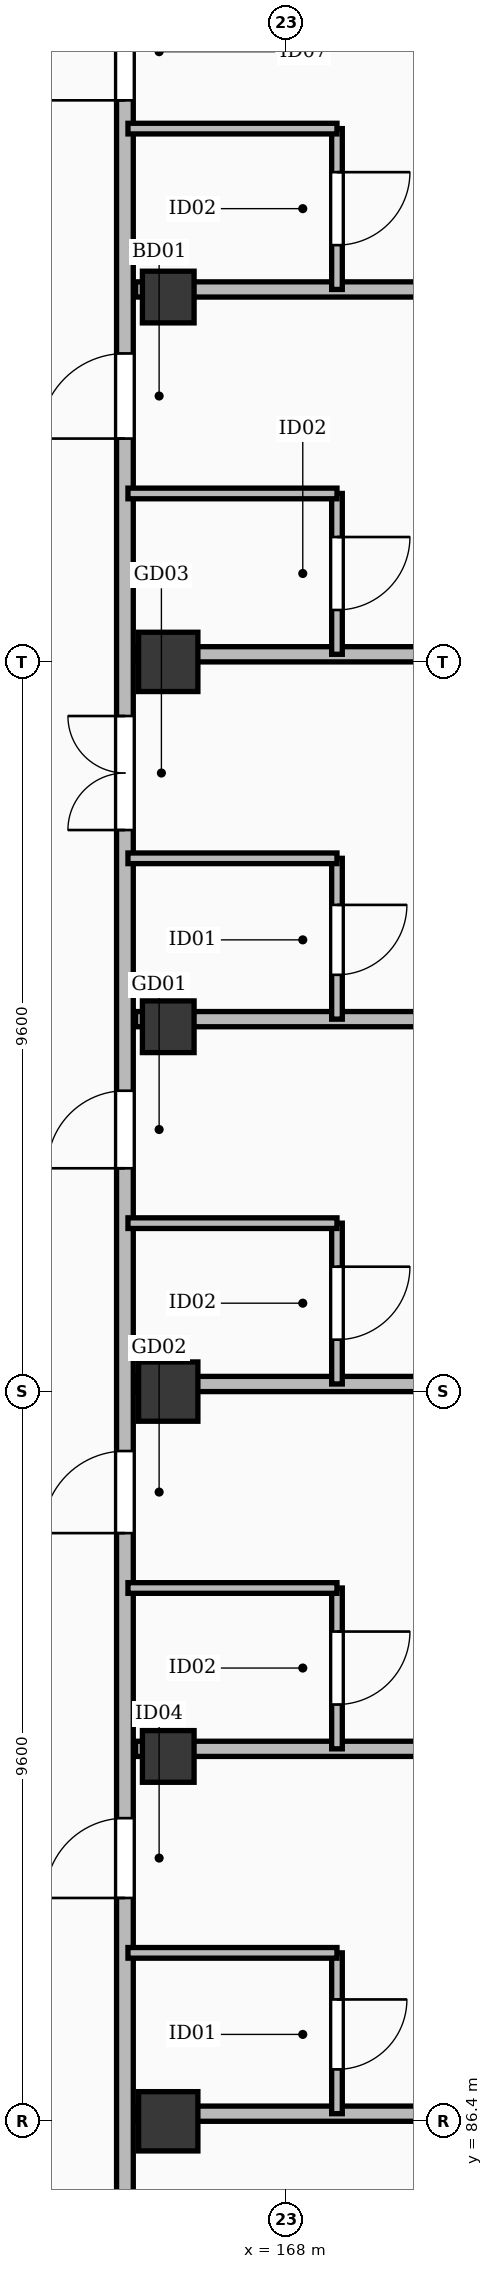
"""IFC4 building model, lengths in metres.
Left out: names, types, materials, properties, quantities, classifications, styles, units other than length and angle.
Written with IfcOpenShell. Run it as: python <this file> out.ifc"""

import sys

from ifc_helpers import new_model, si_unit, direction, frame, frame_2d, origin, origin_2d, place, context, subcontext, project, spatial, rectangle, extrude, element, fill, save


model = new_model("IFC4")
c1 = context("Model", 3, precision=1e-05, world=origin(), true_north=direction((0.0, 1.0)))
c2 = subcontext(c1, "Body", "Model", "MODEL_VIEW")
j1 = project(units=[si_unit("LENGTHUNIT", "METRE"), si_unit("PLANEANGLEUNIT", "RADIAN")], contexts=[c1])
p1 = place(None, origin())
s1 = spatial("IfcSite", under=j1, at=p1, CompositionType="ELEMENT")
p2 = place(p1, origin())
s2 = spatial("IfcBuilding", under=s1, at=p2, CompositionType="ELEMENT")
p3 = place(p2, frame((0.0, 0.0, 24.6)))
s3 = spatial("IfcBuildingStorey", under=s2, at=p3, CompositionType="ELEMENT", Elevation=24.6)
for number, where, z_axis, x_axis in (
    (1, (166.45, 86.4, 0.0), (0.0, 0.0, 1.0), (1.0, 0.0, 0.0)),
    (2, (166.45, 96.0, 0.0), (0.0, 0.0, 1.0), (1.0, 0.0, 0.0)),
    (3, (166.45, 105.6, 0.0), (0.0, 0.0, 1.0), (1.0, 0.0, 0.0)),
):
    element("IfcColumn", number, at=place(p3, frame(where, z_axis=z_axis, x_axis=x_axis)), inside=s3, PredefinedType="COLUMN", context=c2, shape_type="SweptSolid", body=[
        extrude(rectangle(XDim=0.78, YDim=0.78, at=origin_2d()), origin(), (0.0, 0.0, 1.0), 3.6),
    ])
for number, where, z_axis, x_axis in (
    (4, (166.45, 91.2, 0.0), (0.0, 0.0, 1.0), (1.0, 0.0, 0.0)),
    (5, (166.45, 100.8, 0.0), (0.0, 0.0, 1.0), (1.0, 0.0, 0.0)),
    (6, (166.45, 110.4, 0.0), (0.0, 0.0, 1.0), (1.0, 0.0, 0.0)),
):
    element("IfcColumn", number, at=place(p3, frame(where, z_axis=z_axis, x_axis=x_axis)), inside=s3, PredefinedType="COLUMN", context=c2, shape_type="SweptSolid", body=[
        extrude(rectangle(XDim=0.68, YDim=0.68, at=origin_2d()), origin(), (0.0, 0.0, 1.0), 3.6),
    ])
p4 = place(p3, frame((165.88, 65.4, 0.0), z_axis=(0.0, 0.0, 1.0), x_axis=(0.0, 1.0, 0.0)))
e7 = element("IfcWall", 7, at=p4, inside=s3, PredefinedType="PARTITIONING", context=c2, shape_type="SweptSolid", body=[
    extrude(rectangle(XDim=60.25, YDim=0.22, at=frame_2d((30.125, 0.0))), origin(), (0.0, 0.0, 1.0), 2.582),
])
p5 = place(p4, frame((4.738, 0.0, 0.0)))
e8 = element("IfcOpeningElement", 8, at=p5, cuts=e7, PredefinedType="OPENING", context=c2, shape_type="SweptSolid", body=[
    extrude(rectangle(XDim=1.02, YDim=2.2, at=frame_2d((0.51, 1.1))), frame((0.0, 0.122, 0.0), z_axis=(0.0, -1.0, 0.0), x_axis=(1.0, 0.0, 0.0)), (0.0, 0.0, 1.0), 0.244),
])
p6 = place(p4, frame((9.188, 0.0, 0.0)))
e9 = element("IfcOpeningElement", 9, at=p6, cuts=e7, PredefinedType="OPENING", context=c2, shape_type="SweptSolid", body=[
    extrude(rectangle(XDim=1.5, YDim=2.3, at=frame_2d((0.75, 1.15))), frame((0.0, 0.122, 0.0), z_axis=(0.0, -1.0, 0.0), x_axis=(1.0, 0.0, 0.0)), (0.0, 0.0, 1.0), 0.244),
])
p7 = place(p4, frame((14.338, 0.0, 0.0)))
e10 = element("IfcOpeningElement", 10, at=p7, cuts=e7, PredefinedType="OPENING", context=c2, shape_type="SweptSolid", body=[
    extrude(rectangle(XDim=1.12, YDim=2.15, at=frame_2d((0.56, 1.075))), frame((0.0, 0.122, 0.0), z_axis=(0.0, -1.0, 0.0), x_axis=(1.0, 0.0, 0.0)), (0.0, 0.0, 1.0), 0.244),
])
p8 = place(p4, frame((18.788, 0.0, 0.0)))
e11 = element("IfcOpeningElement", 11, at=p8, cuts=e7, PredefinedType="OPENING", context=c2, shape_type="SweptSolid", body=[
    extrude(rectangle(XDim=1.28, YDim=2.16, at=frame_2d((0.64, 1.08))), frame((0.0, 0.122, 0.0), z_axis=(0.0, -1.0, 0.0), x_axis=(1.0, 0.0, 0.0)), (0.0, 0.0, 1.0), 0.244),
])
p9 = place(p4, frame((23.938, 0.0, 0.0)))
e12 = element("IfcOpeningElement", 12, at=p9, cuts=e7, PredefinedType="OPENING", context=c2, shape_type="SweptSolid", body=[
    extrude(rectangle(XDim=1.05, YDim=2.18, at=frame_2d((0.525, 1.09))), frame((0.0, 0.122, 0.0), z_axis=(0.0, -1.0, 0.0), x_axis=(1.0, 0.0, 0.0)), (0.0, 0.0, 1.0), 0.244),
])
p10 = place(p4, frame((28.738, 0.0, 0.0)))
e13 = element("IfcOpeningElement", 13, at=p10, cuts=e7, PredefinedType="OPENING", context=c2, shape_type="SweptSolid", body=[
    extrude(rectangle(XDim=1.08, YDim=2.25, at=frame_2d((0.54, 1.125))), frame((0.0, 0.122, 0.0), z_axis=(0.0, -1.0, 0.0), x_axis=(1.0, 0.0, 0.0)), (0.0, 0.0, 1.0), 0.244),
])
p11 = place(p4, frame((33.538, 0.0, 0.0)))
e14 = element("IfcOpeningElement", 14, at=p11, cuts=e7, PredefinedType="OPENING", context=c2, shape_type="SweptSolid", body=[
    extrude(rectangle(XDim=1.02, YDim=2.2, at=frame_2d((0.51, 1.1))), frame((0.0, 0.122, 0.0), z_axis=(0.0, -1.0, 0.0), x_axis=(1.0, 0.0, 0.0)), (0.0, 0.0, 1.0), 0.244),
])
p12 = place(p4, frame((37.988, 0.0, 0.0)))
e15 = element("IfcOpeningElement", 15, at=p12, cuts=e7, PredefinedType="OPENING", context=c2, shape_type="SweptSolid", body=[
    extrude(rectangle(XDim=1.5, YDim=2.3, at=frame_2d((0.75, 1.15))), frame((0.0, 0.122, 0.0), z_axis=(0.0, -1.0, 0.0), x_axis=(1.0, 0.0, 0.0)), (0.0, 0.0, 1.0), 0.244),
])
p13 = place(p4, frame((43.138, 0.0, 0.0)))
e16 = element("IfcOpeningElement", 16, at=p13, cuts=e7, PredefinedType="OPENING", context=c2, shape_type="SweptSolid", body=[
    extrude(rectangle(XDim=1.12, YDim=2.15, at=frame_2d((0.56, 1.075))), frame((0.0, 0.122, 0.0), z_axis=(0.0, -1.0, 0.0), x_axis=(1.0, 0.0, 0.0)), (0.0, 0.0, 1.0), 0.244),
])
p14 = place(p4, frame((47.588, 0.0, 0.0)))
e17 = element("IfcOpeningElement", 17, at=p14, cuts=e7, PredefinedType="OPENING", context=c2, shape_type="SweptSolid", body=[
    extrude(rectangle(XDim=1.28, YDim=2.16, at=frame_2d((0.64, 1.08))), frame((0.0, 0.122, 0.0), z_axis=(0.0, -1.0, 0.0), x_axis=(1.0, 0.0, 0.0)), (0.0, 0.0, 1.0), 0.244),
])
p15 = place(p4, frame((52.738, 0.0, 0.0)))
e18 = element("IfcOpeningElement", 18, at=p15, cuts=e7, PredefinedType="OPENING", context=c2, shape_type="SweptSolid", body=[
    extrude(rectangle(XDim=1.05, YDim=2.18, at=frame_2d((0.525, 1.09))), frame((0.0, 0.122, 0.0), z_axis=(0.0, -1.0, 0.0), x_axis=(1.0, 0.0, 0.0)), (0.0, 0.0, 1.0), 0.244),
])
p16 = place(p4, frame((57.538, 0.0, 0.0)))
e19 = element("IfcOpeningElement", 19, at=p16, cuts=e7, PredefinedType="OPENING", context=c2, shape_type="SweptSolid", body=[
    extrude(rectangle(XDim=1.08, YDim=2.25, at=frame_2d((0.54, 1.125))), frame((0.0, 0.122, 0.0), z_axis=(0.0, -1.0, 0.0), x_axis=(1.0, 0.0, 0.0)), (0.0, 0.0, 1.0), 0.244),
])
p17 = place(p3, frame((166.02, 86.5, 0.0), z_axis=(0.0, 0.0, 1.0), x_axis=(1.0, 0.0, 0.0)))
e20 = element("IfcWall", 20, at=p17, inside=s3, PredefinedType="PARTITIONING", context=c2, shape_type="SweptSolid", body=[
    extrude(rectangle(XDim=13.23, YDim=0.2, at=frame_2d((6.615, 0.0))), origin(), (0.0, 0.0, 1.0), 2.582),
])
p18 = place(p3, frame((168.67, 86.5, 0.0), z_axis=(0.0, 0.0, 1.0), x_axis=(0.0, 1.0, 0.0)))
e21 = element("IfcWall", 21, at=p18, inside=s3, PredefinedType="PARTITIONING", context=c2, shape_type="SweptSolid", body=[
    extrude(rectangle(XDim=2.116, YDim=0.14, at=frame_2d((1.058, 0.0))), origin(), (0.0, 0.0, 1.0), 2.632),
])
p19 = place(p18, frame((0.583, 0.0, 0.0)))
e22 = element("IfcOpeningElement", 22, at=p19, cuts=e21, PredefinedType="OPENING", context=c2, shape_type="SweptSolid", body=[
    extrude(rectangle(XDim=0.92, YDim=2.1, at=frame_2d((0.46, 1.05))), frame((0.0, 0.082, 0.0), z_axis=(0.0, -1.0, 0.0), x_axis=(1.0, 0.0, 0.0)), (0.0, 0.0, 1.0), 0.164),
])
p20 = place(p3, frame((165.92, 88.616, 0.0), z_axis=(0.0, 0.0, 1.0), x_axis=(1.0, 0.0, 0.0)))
e23 = element("IfcWall", 23, at=p20, inside=s3, PredefinedType="PARTITIONING", context=c2, shape_type="SweptSolid", body=[
    extrude(rectangle(XDim=2.75, YDim=0.14, at=frame_2d((1.375, 0.0))), origin(), (0.0, 0.0, 1.0), 2.632),
])
p21 = place(p3, frame((166.02, 91.3, 0.0), z_axis=(0.0, 0.0, 1.0), x_axis=(1.0, 0.0, 0.0)))
e24 = element("IfcWall", 24, at=p21, inside=s3, PredefinedType="PARTITIONING", context=c2, shape_type="SweptSolid", body=[
    extrude(rectangle(XDim=13.23, YDim=0.2, at=frame_2d((6.615, 0.0))), origin(), (0.0, 0.0, 1.0), 2.582),
])
p22 = place(p3, frame((168.67, 91.3, 0.0), z_axis=(0.0, 0.0, 1.0), x_axis=(0.0, 1.0, 0.0)))
e25 = element("IfcWall", 25, at=p22, inside=s3, PredefinedType="PARTITIONING", context=c2, shape_type="SweptSolid", body=[
    extrude(rectangle(XDim=2.116, YDim=0.14, at=frame_2d((1.058, 0.0))), origin(), (0.0, 0.0, 1.0), 2.632),
])
p23 = place(p22, frame((0.583, 0.0, 0.0)))
e26 = element("IfcOpeningElement", 26, at=p23, cuts=e25, PredefinedType="OPENING", context=c2, shape_type="SweptSolid", body=[
    extrude(rectangle(XDim=0.96, YDim=2.12, at=frame_2d((0.48, 1.06))), frame((0.0, 0.082, 0.0), z_axis=(0.0, -1.0, 0.0), x_axis=(1.0, 0.0, 0.0)), (0.0, 0.0, 1.0), 0.164),
])
p24 = place(p3, frame((165.92, 93.416, 0.0), z_axis=(0.0, 0.0, 1.0), x_axis=(1.0, 0.0, 0.0)))
e27 = element("IfcWall", 27, at=p24, inside=s3, PredefinedType="PARTITIONING", context=c2, shape_type="SweptSolid", body=[
    extrude(rectangle(XDim=2.75, YDim=0.14, at=frame_2d((1.375, 0.0))), origin(), (0.0, 0.0, 1.0), 2.632),
])
p25 = place(p3, frame((166.02, 96.1, 0.0), z_axis=(0.0, 0.0, 1.0), x_axis=(1.0, 0.0, 0.0)))
e28 = element("IfcWall", 28, at=p25, inside=s3, PredefinedType="PARTITIONING", context=c2, shape_type="SweptSolid", body=[
    extrude(rectangle(XDim=13.23, YDim=0.2, at=frame_2d((6.615, 0.0))), origin(), (0.0, 0.0, 1.0), 2.582),
])
p26 = place(p3, frame((168.67, 96.1, 0.0), z_axis=(0.0, 0.0, 1.0), x_axis=(0.0, 1.0, 0.0)))
e29 = element("IfcWall", 29, at=p26, inside=s3, PredefinedType="PARTITIONING", context=c2, shape_type="SweptSolid", body=[
    extrude(rectangle(XDim=2.116, YDim=0.14, at=frame_2d((1.058, 0.0))), origin(), (0.0, 0.0, 1.0), 2.632),
])
p27 = place(p26, frame((0.583, 0.0, 0.0)))
e30 = element("IfcOpeningElement", 30, at=p27, cuts=e29, PredefinedType="OPENING", context=c2, shape_type="SweptSolid", body=[
    extrude(rectangle(XDim=0.96, YDim=2.12, at=frame_2d((0.48, 1.06))), frame((0.0, 0.082, 0.0), z_axis=(0.0, -1.0, 0.0), x_axis=(1.0, 0.0, 0.0)), (0.0, 0.0, 1.0), 0.164),
])
p28 = place(p3, frame((165.92, 98.216, 0.0), z_axis=(0.0, 0.0, 1.0), x_axis=(1.0, 0.0, 0.0)))
e31 = element("IfcWall", 31, at=p28, inside=s3, PredefinedType="PARTITIONING", context=c2, shape_type="SweptSolid", body=[
    extrude(rectangle(XDim=2.75, YDim=0.14, at=frame_2d((1.375, 0.0))), origin(), (0.0, 0.0, 1.0), 2.632),
])
p29 = place(p3, frame((166.02, 100.9, 0.0), z_axis=(0.0, 0.0, 1.0), x_axis=(1.0, 0.0, 0.0)))
e32 = element("IfcWall", 32, at=p29, inside=s3, PredefinedType="PARTITIONING", context=c2, shape_type="SweptSolid", body=[
    extrude(rectangle(XDim=13.23, YDim=0.2, at=frame_2d((6.615, 0.0))), origin(), (0.0, 0.0, 1.0), 2.582),
])
p30 = place(p3, frame((168.67, 100.9, 0.0), z_axis=(0.0, 0.0, 1.0), x_axis=(0.0, 1.0, 0.0)))
e33 = element("IfcWall", 33, at=p30, inside=s3, PredefinedType="PARTITIONING", context=c2, shape_type="SweptSolid", body=[
    extrude(rectangle(XDim=2.116, YDim=0.14, at=frame_2d((1.058, 0.0))), origin(), (0.0, 0.0, 1.0), 2.632),
])
p31 = place(p30, frame((0.583, 0.0, 0.0)))
e34 = element("IfcOpeningElement", 34, at=p31, cuts=e33, PredefinedType="OPENING", context=c2, shape_type="SweptSolid", body=[
    extrude(rectangle(XDim=0.92, YDim=2.1, at=frame_2d((0.46, 1.05))), frame((0.0, 0.082, 0.0), z_axis=(0.0, -1.0, 0.0), x_axis=(1.0, 0.0, 0.0)), (0.0, 0.0, 1.0), 0.164),
])
p32 = place(p3, frame((165.92, 103.016, 0.0), z_axis=(0.0, 0.0, 1.0), x_axis=(1.0, 0.0, 0.0)))
e35 = element("IfcWall", 35, at=p32, inside=s3, PredefinedType="PARTITIONING", context=c2, shape_type="SweptSolid", body=[
    extrude(rectangle(XDim=2.75, YDim=0.14, at=frame_2d((1.375, 0.0))), origin(), (0.0, 0.0, 1.0), 2.632),
])
p33 = place(p3, frame((166.02, 105.7, 0.0), z_axis=(0.0, 0.0, 1.0), x_axis=(1.0, 0.0, 0.0)))
e36 = element("IfcWall", 36, at=p33, inside=s3, PredefinedType="PARTITIONING", context=c2, shape_type="SweptSolid", body=[
    extrude(rectangle(XDim=13.23, YDim=0.2, at=frame_2d((6.615, 0.0))), origin(), (0.0, 0.0, 1.0), 2.582),
])
p34 = place(p3, frame((168.67, 105.7, 0.0), z_axis=(0.0, 0.0, 1.0), x_axis=(0.0, 1.0, 0.0)))
e37 = element("IfcWall", 37, at=p34, inside=s3, PredefinedType="PARTITIONING", context=c2, shape_type="SweptSolid", body=[
    extrude(rectangle(XDim=2.116, YDim=0.14, at=frame_2d((1.058, 0.0))), origin(), (0.0, 0.0, 1.0), 2.632),
])
p35 = place(p34, frame((0.583, 0.0, 0.0)))
e38 = element("IfcOpeningElement", 38, at=p35, cuts=e37, PredefinedType="OPENING", context=c2, shape_type="SweptSolid", body=[
    extrude(rectangle(XDim=0.96, YDim=2.12, at=frame_2d((0.48, 1.06))), frame((0.0, 0.082, 0.0), z_axis=(0.0, -1.0, 0.0), x_axis=(1.0, 0.0, 0.0)), (0.0, 0.0, 1.0), 0.164),
])
p36 = place(p3, frame((165.92, 107.816, 0.0), z_axis=(0.0, 0.0, 1.0), x_axis=(1.0, 0.0, 0.0)))
e39 = element("IfcWall", 39, at=p36, inside=s3, PredefinedType="PARTITIONING", context=c2, shape_type="SweptSolid", body=[
    extrude(rectangle(XDim=2.75, YDim=0.14, at=frame_2d((1.375, 0.0))), origin(), (0.0, 0.0, 1.0), 2.632),
])
p37 = place(p3, frame((166.02, 110.5, 0.0), z_axis=(0.0, 0.0, 1.0), x_axis=(1.0, 0.0, 0.0)))
e40 = element("IfcWall", 40, at=p37, inside=s3, PredefinedType="PARTITIONING", context=c2, shape_type="SweptSolid", body=[
    extrude(rectangle(XDim=13.23, YDim=0.2, at=frame_2d((6.615, 0.0))), origin(), (0.0, 0.0, 1.0), 2.582),
])
p38 = place(p3, frame((168.67, 110.5, 0.0), z_axis=(0.0, 0.0, 1.0), x_axis=(0.0, 1.0, 0.0)))
e41 = element("IfcWall", 41, at=p38, inside=s3, PredefinedType="PARTITIONING", context=c2, shape_type="SweptSolid", body=[
    extrude(rectangle(XDim=2.116, YDim=0.14, at=frame_2d((1.058, 0.0))), origin(), (0.0, 0.0, 1.0), 2.632),
])
p39 = place(p38, frame((0.583, 0.0, 0.0)))
e42 = element("IfcOpeningElement", 42, at=p39, cuts=e41, PredefinedType="OPENING", context=c2, shape_type="SweptSolid", body=[
    extrude(rectangle(XDim=0.96, YDim=2.12, at=frame_2d((0.48, 1.06))), frame((0.0, 0.082, 0.0), z_axis=(0.0, -1.0, 0.0), x_axis=(1.0, 0.0, 0.0)), (0.0, 0.0, 1.0), 0.164),
])
p40 = place(p3, frame((165.92, 112.616, 0.0), z_axis=(0.0, 0.0, 1.0), x_axis=(1.0, 0.0, 0.0)))
e43 = element("IfcWall", 43, at=p40, inside=s3, PredefinedType="PARTITIONING", context=c2, shape_type="SweptSolid", body=[
    extrude(rectangle(XDim=2.75, YDim=0.14, at=frame_2d((1.375, 0.0))), origin(), (0.0, 0.0, 1.0), 2.632),
])
p41 = place(p9, origin())
e44 = element("IfcDoor", 44, at=p41, inside=s3, OperationType="SINGLE_SWING_LEFT", PredefinedType="DOOR", context=c2, shape_type="SweptSolid", body=[
    extrude(rectangle(XDim=1.05, YDim=2.18, at=frame_2d((0.525, 1.09))), frame((0.0, 0.025, 0.0), z_axis=(0.0, -1.0, 0.0), x_axis=(1.0, 0.0, 0.0)), (0.0, 0.0, 1.0), 0.05),
])
fill(e12, e44)
p42 = place(p19, frame((0.92, 0.0, 0.0), z_axis=(0.0, 0.0, 1.0), x_axis=(-1.0, 0.0, 0.0)))
e45 = element("IfcDoor", 45, at=p42, inside=s3, OperationType="SINGLE_SWING_RIGHT", PredefinedType="DOOR", context=c2, shape_type="SweptSolid", body=[
    extrude(rectangle(XDim=0.92, YDim=2.1, at=frame_2d((0.46, 1.05))), frame((0.0, 0.025, 0.0), z_axis=(0.0, -1.0, 0.0), x_axis=(1.0, 0.0, 0.0)), (0.0, 0.0, 1.0), 0.05),
])
fill(e22, e45)
p43 = place(p10, origin())
e46 = element("IfcDoor", 46, at=p43, inside=s3, OperationType="SINGLE_SWING_LEFT", PredefinedType="DOOR", context=c2, shape_type="SweptSolid", body=[
    extrude(rectangle(XDim=1.08, YDim=2.25, at=frame_2d((0.54, 1.125))), frame((0.0, 0.025, 0.0), z_axis=(0.0, -1.0, 0.0), x_axis=(1.0, 0.0, 0.0)), (0.0, 0.0, 1.0), 0.05),
])
fill(e13, e46)
p44 = place(p23, frame((0.96, 0.0, 0.0), z_axis=(0.0, 0.0, 1.0), x_axis=(-1.0, 0.0, 0.0)))
e47 = element("IfcDoor", 47, at=p44, inside=s3, OperationType="SINGLE_SWING_RIGHT", PredefinedType="DOOR", context=c2, shape_type="SweptSolid", body=[
    extrude(rectangle(XDim=0.96, YDim=2.12, at=frame_2d((0.48, 1.06))), frame((0.0, 0.025, 0.0), z_axis=(0.0, -1.0, 0.0), x_axis=(1.0, 0.0, 0.0)), (0.0, 0.0, 1.0), 0.05),
])
fill(e26, e47)
p45 = place(p11, origin())
e48 = element("IfcDoor", 48, at=p45, inside=s3, OperationType="SINGLE_SWING_LEFT", PredefinedType="DOOR", context=c2, shape_type="SweptSolid", body=[
    extrude(rectangle(XDim=1.02, YDim=2.2, at=frame_2d((0.51, 1.1))), frame((0.0, 0.025, 0.0), z_axis=(0.0, -1.0, 0.0), x_axis=(1.0, 0.0, 0.0)), (0.0, 0.0, 1.0), 0.05),
])
fill(e14, e48)
p46 = place(p27, frame((0.96, 0.0, 0.0), z_axis=(0.0, 0.0, 1.0), x_axis=(-1.0, 0.0, 0.0)))
e49 = element("IfcDoor", 49, at=p46, inside=s3, OperationType="SINGLE_SWING_RIGHT", PredefinedType="DOOR", context=c2, shape_type="SweptSolid", body=[
    extrude(rectangle(XDim=0.96, YDim=2.12, at=frame_2d((0.48, 1.06))), frame((0.0, 0.025, 0.0), z_axis=(0.0, -1.0, 0.0), x_axis=(1.0, 0.0, 0.0)), (0.0, 0.0, 1.0), 0.05),
])
fill(e30, e49)
p47 = place(p12, origin())
e50 = element("IfcDoor", 50, at=p47, inside=s3, OperationType="DOUBLE_DOOR_SINGLE_SWING", PredefinedType="DOOR", context=c2, shape_type="SweptSolid", body=[
    extrude(rectangle(XDim=1.5, YDim=2.3, at=frame_2d((0.75, 1.15))), frame((0.0, 0.025, 0.0), z_axis=(0.0, -1.0, 0.0), x_axis=(1.0, 0.0, 0.0)), (0.0, 0.0, 1.0), 0.05),
])
fill(e15, e50)
p48 = place(p31, frame((0.92, 0.0, 0.0), z_axis=(0.0, 0.0, 1.0), x_axis=(-1.0, 0.0, 0.0)))
e51 = element("IfcDoor", 51, at=p48, inside=s3, OperationType="SINGLE_SWING_RIGHT", PredefinedType="DOOR", context=c2, shape_type="SweptSolid", body=[
    extrude(rectangle(XDim=0.92, YDim=2.1, at=frame_2d((0.46, 1.05))), frame((0.0, 0.025, 0.0), z_axis=(0.0, -1.0, 0.0), x_axis=(1.0, 0.0, 0.0)), (0.0, 0.0, 1.0), 0.05),
])
fill(e34, e51)
p49 = place(p13, origin())
e52 = element("IfcDoor", 52, at=p49, inside=s3, OperationType="SINGLE_SWING_LEFT", PredefinedType="DOOR", context=c2, shape_type="SweptSolid", body=[
    extrude(rectangle(XDim=1.12, YDim=2.15, at=frame_2d((0.56, 1.075))), frame((0.0, 0.025, 0.0), z_axis=(0.0, -1.0, 0.0), x_axis=(1.0, 0.0, 0.0)), (0.0, 0.0, 1.0), 0.05),
])
fill(e16, e52)
p50 = place(p35, frame((0.96, 0.0, 0.0), z_axis=(0.0, 0.0, 1.0), x_axis=(-1.0, 0.0, 0.0)))
e53 = element("IfcDoor", 53, at=p50, inside=s3, OperationType="SINGLE_SWING_RIGHT", PredefinedType="DOOR", context=c2, shape_type="SweptSolid", body=[
    extrude(rectangle(XDim=0.96, YDim=2.12, at=frame_2d((0.48, 1.06))), frame((0.0, 0.025, 0.0), z_axis=(0.0, -1.0, 0.0), x_axis=(1.0, 0.0, 0.0)), (0.0, 0.0, 1.0), 0.05),
])
fill(e38, e53)
p51 = place(p14, origin())
e54 = element("IfcDoor", 54, at=p51, inside=s3, OperationType="SINGLE_SWING_LEFT", PredefinedType="DOOR", context=c2, shape_type="SweptSolid", body=[
    extrude(rectangle(XDim=1.28, YDim=2.16, at=frame_2d((0.64, 1.08))), frame((0.0, 0.025, 0.0), z_axis=(0.0, -1.0, 0.0), x_axis=(1.0, 0.0, 0.0)), (0.0, 0.0, 1.0), 0.05),
])
fill(e17, e54)
p52 = place(p39, frame((0.96, 0.0, 0.0), z_axis=(0.0, 0.0, 1.0), x_axis=(-1.0, 0.0, 0.0)))
e55 = element("IfcDoor", 55, at=p52, inside=s3, OperationType="SINGLE_SWING_RIGHT", PredefinedType="DOOR", context=c2, shape_type="SweptSolid", body=[
    extrude(rectangle(XDim=0.96, YDim=2.12, at=frame_2d((0.48, 1.06))), frame((0.0, 0.025, 0.0), z_axis=(0.0, -1.0, 0.0), x_axis=(1.0, 0.0, 0.0)), (0.0, 0.0, 1.0), 0.05),
])
fill(e42, e55)
save(model, sys.argv[1])
